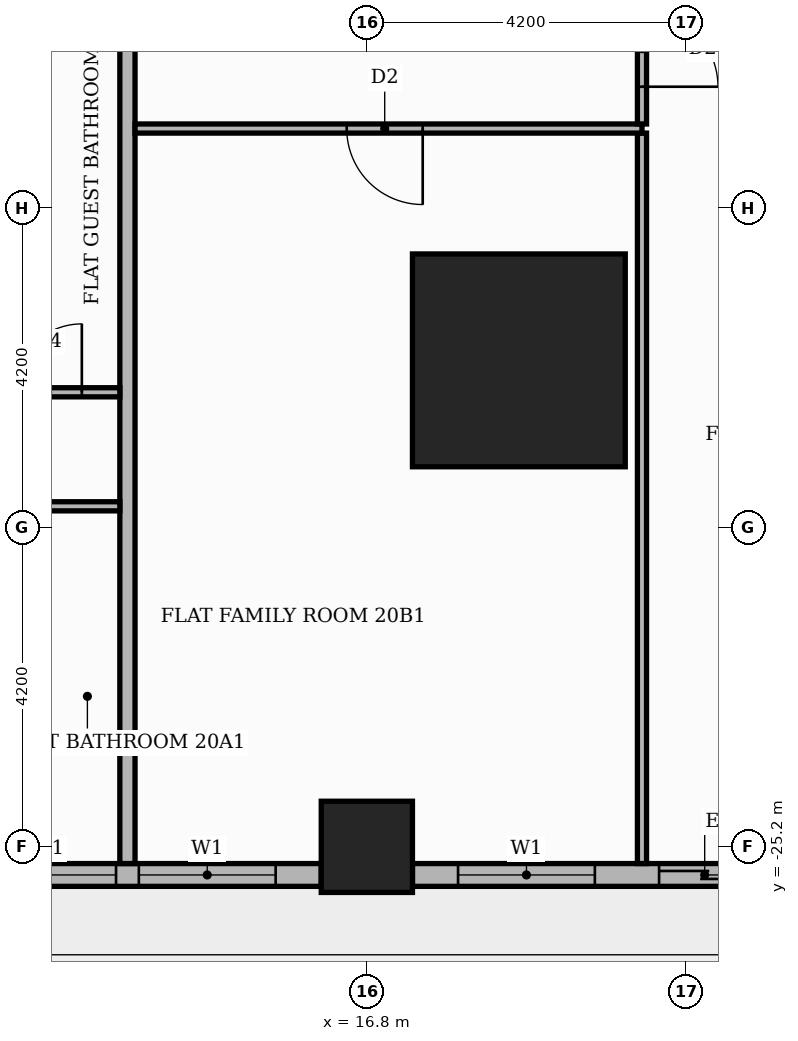
"""IFC4 building model, lengths in metres.
Left out: names, types, materials, properties, quantities, classifications, styles, units other than length and angle.
Written with IfcOpenShell. Run it as: python <this file> out.ifc"""

import sys

from ifc_helpers import new_model, si_unit, direction, frame, frame_2d, origin, origin_2d, place, context, subcontext, project, spatial, rectangle, extrude, element, fill, save


model = new_model("IFC4")
c1 = context("Model", 3, precision=1e-05, world=origin(), true_north=direction((0.0, 1.0)))
c2 = subcontext(c1, "Body", "Model", "MODEL_VIEW")
j1 = project(units=[si_unit("LENGTHUNIT", "METRE"), si_unit("PLANEANGLEUNIT", "RADIAN")], contexts=[c1])
p1 = place(None, origin())
s1 = spatial("IfcSite", under=j1, at=p1, CompositionType="ELEMENT")
p2 = place(p1, origin())
s2 = spatial("IfcBuilding", under=s1, at=p2, CompositionType="ELEMENT")
p3 = place(p2, frame((0.0, 0.0, 87.0)))
s3 = spatial("IfcBuildingStorey", under=s2, at=p3, CompositionType="ELEMENT", Elevation=87.0)
p4 = place(p3, frame((18.8, -18.8, 0.0), z_axis=(0.0, 0.0, 1.0), x_axis=(1.0, 0.0, 0.0)))
e1 = element("IfcColumn", 1, at=p4, inside=s3, PredefinedType="COLUMN", context=c2, shape_type="SweptSolid", body=[
    extrude(rectangle(XDim=2.8, YDim=2.8, at=origin_2d()), origin(), (0.0, 0.0, 1.0), 3.9),
])
p5 = place(p3, frame((16.8, -25.2, 0.0), z_axis=(0.0, 0.0, 1.0), x_axis=(1.0, 0.0, 0.0)))
e2 = element("IfcColumn", 2, at=p5, inside=s3, PredefinedType="COLUMN", context=c2, shape_type="SweptSolid", body=[
    extrude(rectangle(XDim=1.2, YDim=1.2, at=origin_2d()), origin(), (0.0, 0.0, 1.0), 3.9),
])
p6 = place(p3, frame((9.0, -25.57, 0.0), z_axis=(0.0, 0.0, 1.0), x_axis=(1.0, 0.0, 0.0)))
e3 = element("IfcWall", 3, at=p6, inside=s3, PredefinedType="STANDARD", context=c2, shape_type="SweptSolid", body=[
    extrude(rectangle(XDim=7.2, YDim=0.3, at=frame_2d((3.6, 0.0))), origin(), (0.0, 0.0, 1.0), 3.48),
])
p7 = place(p6, frame((0.6, 0.0, 0.9)))
e4 = element("IfcOpeningElement", 4, at=p7, cuts=e3, PredefinedType="OPENING", context=c2, shape_type="SweptSolid", body=[
    extrude(rectangle(XDim=1.8, YDim=2.1, at=frame_2d((0.9, 1.05))), frame((0.0, 0.16, 0.0), z_axis=(0.0, -1.0, 0.0), x_axis=(1.0, 0.0, 0.0)), (0.0, 0.0, 1.0), 0.32),
])
p8 = place(p6, frame((2.7, 0.0, 0.9)))
e5 = element("IfcOpeningElement", 5, at=p8, cuts=e3, PredefinedType="OPENING", context=c2, shape_type="SweptSolid", body=[
    extrude(rectangle(XDim=1.8, YDim=2.1, at=frame_2d((0.9, 1.05))), frame((0.0, 0.16, 0.0), z_axis=(0.0, -1.0, 0.0), x_axis=(1.0, 0.0, 0.0)), (0.0, 0.0, 1.0), 0.32),
])
p9 = place(p6, frame((4.8, 0.0, 0.9)))
e6 = element("IfcOpeningElement", 6, at=p9, cuts=e3, PredefinedType="OPENING", context=c2, shape_type="SweptSolid", body=[
    extrude(rectangle(XDim=1.8, YDim=2.1, at=frame_2d((0.9, 1.05))), frame((0.0, 0.16, 0.0), z_axis=(0.0, -1.0, 0.0), x_axis=(1.0, 0.0, 0.0)), (0.0, 0.0, 1.0), 0.32),
])
p10 = place(p3, frame((17.4, -25.57, 0.0), z_axis=(0.0, 0.0, 1.0), x_axis=(1.0, 0.0, 0.0)))
e7 = element("IfcWall", 7, at=p10, inside=s3, PredefinedType="STANDARD", context=c2, shape_type="SweptSolid", body=[
    extrude(rectangle(XDim=4.82, YDim=0.3, at=frame_2d((2.41, 0.0))), origin(), (0.0, 0.0, 1.0), 3.48),
])
p11 = place(p10, frame((0.6, 0.0, 0.9)))
e8 = element("IfcOpeningElement", 8, at=p11, cuts=e7, PredefinedType="OPENING", context=c2, shape_type="SweptSolid", body=[
    extrude(rectangle(XDim=1.8, YDim=2.1, at=frame_2d((0.9, 1.05))), frame((0.0, 0.16, 0.0), z_axis=(0.0, -1.0, 0.0), x_axis=(1.0, 0.0, 0.0)), (0.0, 0.0, 1.0), 0.32),
])
p12 = place(p10, frame((3.245, 0.0, 0.0)))
e9 = element("IfcOpeningElement", 9, at=p12, cuts=e7, PredefinedType="OPENING", context=c2, shape_type="SweptSolid", body=[
    extrude(rectangle(XDim=1.2, YDim=2.4, at=frame_2d((0.6, 1.2))), frame((0.0, 0.16, 0.0), z_axis=(0.0, -1.0, 0.0), x_axis=(1.0, 0.0, 0.0)), (0.0, 0.0, 1.0), 0.32),
])
p13 = place(p3, frame((13.65, -25.42, 0.0), z_axis=(0.0, 0.0, 1.0), x_axis=(0.0, 1.0, 0.0)))
e10 = element("IfcWall", 10, at=p13, inside=s3, PredefinedType="PARTITIONING", context=c2, shape_type="SweptSolid", body=[
    extrude(rectangle(XDim=11.67, YDim=0.2, at=frame_2d((5.835, 0.0))), origin(), (0.0, 0.0, 1.0), 3.48),
])
p14 = place(p3, frame((20.42, -25.42, 0.0), z_axis=(0.0, 0.0, 1.0), x_axis=(0.0, 1.0, 0.0)))
e11 = element("IfcWall", 11, at=p14, inside=s3, PredefinedType="PARTITIONING", context=c2, shape_type="SweptSolid", body=[
    extrude(rectangle(XDim=9.61, YDim=0.12, at=frame_2d((4.805, 0.0))), origin(), (0.0, 0.0, 1.0), 3.48),
])
p15 = place(p3, frame((-25.42, -20.72, 0.0), z_axis=(0.0, 0.0, 1.0), x_axis=(1.0, 0.0, 0.0)))
e12 = element("IfcWall", 12, at=p15, inside=s3, PredefinedType="PARTITIONING", context=c2, shape_type="SweptSolid", body=[
    extrude(rectangle(XDim=38.97, YDim=0.12, at=frame_2d((19.485, 0.0))), origin(), (0.0, 0.0, 1.0), 3.48),
])
p16 = place(p15, frame((12.32, 0.0, 0.0)))
e13 = element("IfcOpeningElement", 13, at=p16, cuts=e12, PredefinedType="OPENING", context=c2, shape_type="SweptSolid", body=[
    extrude(rectangle(XDim=1.0, YDim=2.1, at=frame_2d((0.5, 1.05))), frame((0.0, 0.07, 0.0), z_axis=(0.0, -1.0, 0.0), x_axis=(1.0, 0.0, 0.0)), (0.0, 0.0, 1.0), 0.14),
])
p17 = place(p15, frame((16.52, 0.0, 0.0)))
e14 = element("IfcOpeningElement", 14, at=p17, cuts=e12, PredefinedType="OPENING", context=c2, shape_type="SweptSolid", body=[
    extrude(rectangle(XDim=1.0, YDim=2.1, at=frame_2d((0.5, 1.05))), frame((0.0, 0.07, 0.0), z_axis=(0.0, -1.0, 0.0), x_axis=(1.0, 0.0, 0.0)), (0.0, 0.0, 1.0), 0.14),
])
p18 = place(p15, frame((23.92, 0.0, 0.0)))
e15 = element("IfcOpeningElement", 15, at=p18, cuts=e12, PredefinedType="OPENING", context=c2, shape_type="SweptSolid", body=[
    extrude(rectangle(XDim=0.9, YDim=2.1, at=frame_2d((0.45, 1.05))), frame((0.0, 0.07, 0.0), z_axis=(0.0, -1.0, 0.0), x_axis=(1.0, 0.0, 0.0)), (0.0, 0.0, 1.0), 0.14),
])
p19 = place(p15, frame((34.42, 0.0, 0.0)))
e16 = element("IfcOpeningElement", 16, at=p19, cuts=e12, PredefinedType="OPENING", context=c2, shape_type="SweptSolid", body=[
    extrude(rectangle(XDim=0.9, YDim=2.1, at=frame_2d((0.45, 1.05))), frame((0.0, 0.07, 0.0), z_axis=(0.0, -1.0, 0.0), x_axis=(1.0, 0.0, 0.0)), (0.0, 0.0, 1.0), 0.14),
])
p20 = place(p3, frame((-7.35, -19.22, 0.0), z_axis=(0.0, 0.0, 1.0), x_axis=(1.0, 0.0, 0.0)))
e17 = element("IfcWall", 17, at=p20, inside=s3, PredefinedType="PARTITIONING", context=c2, shape_type="SweptSolid", body=[
    extrude(rectangle(XDim=20.9, YDim=0.12, at=frame_2d((10.45, 0.0))), origin(), (0.0, 0.0, 1.0), 3.48),
])
p21 = place(p20, frame((2.7, 0.0, 0.0)))
e18 = element("IfcOpeningElement", 18, at=p21, cuts=e17, PredefinedType="OPENING", context=c2, shape_type="SweptSolid", body=[
    extrude(rectangle(XDim=0.9, YDim=2.1, at=frame_2d((0.45, 1.05))), frame((0.0, 0.07, 0.0), z_axis=(0.0, -1.0, 0.0), x_axis=(1.0, 0.0, 0.0)), (0.0, 0.0, 1.0), 0.14),
])
p22 = place(p20, frame((7.95, 0.0, 0.0)))
e19 = element("IfcOpeningElement", 19, at=p22, cuts=e17, PredefinedType="OPENING", context=c2, shape_type="SweptSolid", body=[
    extrude(rectangle(XDim=0.9, YDim=2.1, at=frame_2d((0.45, 1.05))), frame((0.0, 0.07, 0.0), z_axis=(0.0, -1.0, 0.0), x_axis=(1.0, 0.0, 0.0)), (0.0, 0.0, 1.0), 0.14),
])
p23 = place(p20, frame((13.05, 0.0, 0.0)))
e20 = element("IfcOpeningElement", 20, at=p23, cuts=e17, PredefinedType="OPENING", context=c2, shape_type="SweptSolid", body=[
    extrude(rectangle(XDim=0.9, YDim=2.1, at=frame_2d((0.45, 1.05))), frame((0.0, 0.07, 0.0), z_axis=(0.0, -1.0, 0.0), x_axis=(1.0, 0.0, 0.0)), (0.0, 0.0, 1.0), 0.14),
])
p24 = place(p20, frame((17.25, 0.0, 0.0)))
e21 = element("IfcOpeningElement", 21, at=p24, cuts=e17, PredefinedType="OPENING", context=c2, shape_type="SweptSolid", body=[
    extrude(rectangle(XDim=0.9, YDim=2.1, at=frame_2d((0.45, 1.05))), frame((0.0, 0.07, 0.0), z_axis=(0.0, -1.0, 0.0), x_axis=(1.0, 0.0, 0.0)), (0.0, 0.0, 1.0), 0.14),
])
p25 = place(p20, frame((19.5, 0.0, 0.0)))
e22 = element("IfcOpeningElement", 22, at=p25, cuts=e17, PredefinedType="OPENING", context=c2, shape_type="SweptSolid", body=[
    extrude(rectangle(XDim=0.9, YDim=2.1, at=frame_2d((0.45, 1.05))), frame((0.0, 0.07, 0.0), z_axis=(0.0, -1.0, 0.0), x_axis=(1.0, 0.0, 0.0)), (0.0, 0.0, 1.0), 0.14),
])
p26 = place(p3, frame((13.75, -15.75, 0.0), z_axis=(0.0, 0.0, 1.0), x_axis=(1.0, 0.0, 0.0)))
e23 = element("IfcWall", 23, at=p26, inside=s3, PredefinedType="PARTITIONING", context=c2, shape_type="SweptSolid", body=[
    extrude(rectangle(XDim=6.67, YDim=0.12, at=frame_2d((3.335, 0.0))), origin(), (0.0, 0.0, 1.0), 3.48),
])
p27 = place(p26, frame((2.785, 0.0, 0.0)))
e24 = element("IfcOpeningElement", 24, at=p27, cuts=e23, PredefinedType="OPENING", context=c2, shape_type="SweptSolid", body=[
    extrude(rectangle(XDim=1.0, YDim=2.1, at=frame_2d((0.5, 1.05))), frame((0.0, 0.07, 0.0), z_axis=(0.0, -1.0, 0.0), x_axis=(1.0, 0.0, 0.0)), (0.0, 0.0, 1.0), 0.14),
])
p28 = place(p3, frame((20.42, -15.69, 0.0), z_axis=(0.0, 0.0, 1.0), x_axis=(0.0, 1.0, 0.0)))
e25 = element("IfcWall", 25, at=p28, inside=s3, PredefinedType="PARTITIONING", context=c2, shape_type="SweptSolid", body=[
    extrude(rectangle(XDim=1.98, YDim=0.12, at=frame_2d((0.99, 0.0))), origin(), (0.0, 0.0, 1.0), 3.48),
])
p29 = place(p28, frame((0.49, 0.0, 0.0)))
e26 = element("IfcOpeningElement", 26, at=p29, cuts=e25, PredefinedType="OPENING", context=c2, shape_type="SweptSolid", body=[
    extrude(rectangle(XDim=1.0, YDim=2.1, at=frame_2d((0.5, 1.05))), frame((0.0, 0.07, 0.0), z_axis=(0.0, -1.0, 0.0), x_axis=(1.0, 0.0, 0.0)), (0.0, 0.0, 1.0), 0.14),
])
p30 = place(p8, origin())
e27 = element("IfcWindow", 27, at=p30, inside=s3, PartitioningType="SINGLE_PANEL", PredefinedType="WINDOW", context=c2, shape_type="SweptSolid", body=[
    extrude(rectangle(XDim=1.8, YDim=2.1, at=frame_2d((0.9, 1.05))), frame((0.0, 0.03, 0.0), z_axis=(0.0, -1.0, 0.0), x_axis=(1.0, 0.0, 0.0)), (0.0, 0.0, 1.0), 0.06),
])
fill(e5, e27)
p31 = place(p9, origin())
e28 = element("IfcWindow", 28, at=p31, inside=s3, PartitioningType="SINGLE_PANEL", PredefinedType="WINDOW", context=c2, shape_type="SweptSolid", body=[
    extrude(rectangle(XDim=1.8, YDim=2.1, at=frame_2d((0.9, 1.05))), frame((0.0, 0.03, 0.0), z_axis=(0.0, -1.0, 0.0), x_axis=(1.0, 0.0, 0.0)), (0.0, 0.0, 1.0), 0.06),
])
fill(e6, e28)
p32 = place(p11, origin())
e29 = element("IfcWindow", 29, at=p32, inside=s3, PartitioningType="SINGLE_PANEL", PredefinedType="WINDOW", context=c2, shape_type="SweptSolid", body=[
    extrude(rectangle(XDim=1.8, YDim=2.1, at=frame_2d((0.9, 1.05))), frame((0.0, 0.03, 0.0), z_axis=(0.0, -1.0, 0.0), x_axis=(1.0, 0.0, 0.0)), (0.0, 0.0, 1.0), 0.06),
])
fill(e8, e29)
p33 = place(p12, origin())
e30 = element("IfcDoor", 30, at=p33, inside=s3, OperationType="SLIDING_TO_RIGHT", PredefinedType="DOOR", context=c2, shape_type="SweptSolid", body=[
    extrude(rectangle(XDim=1.2, YDim=2.4, at=frame_2d((0.6, 1.2))), frame((0.0, 0.025, 0.0), z_axis=(0.0, -1.0, 0.0), x_axis=(1.0, 0.0, 0.0)), (0.0, 0.0, 1.0), 0.05),
])
fill(e9, e30)
p34 = place(p25, origin())
e31 = element("IfcDoor", 31, at=p34, inside=s3, OperationType="SINGLE_SWING_RIGHT", PredefinedType="DOOR", context=c2, shape_type="SweptSolid", body=[
    extrude(rectangle(XDim=0.9, YDim=2.1, at=frame_2d((0.45, 1.05))), frame((0.0, 0.025, 0.0), z_axis=(0.0, -1.0, 0.0), x_axis=(1.0, 0.0, 0.0)), (0.0, 0.0, 1.0), 0.05),
])
fill(e22, e31)
p35 = place(p27, frame((1.0, 0.0, 0.0), z_axis=(0.0, 0.0, 1.0), x_axis=(-1.0, 0.0, 0.0)))
e32 = element("IfcDoor", 32, at=p35, inside=s3, OperationType="SINGLE_SWING_RIGHT", PredefinedType="DOOR", context=c2, shape_type="SweptSolid", body=[
    extrude(rectangle(XDim=1.0, YDim=2.1, at=frame_2d((0.5, 1.05))), frame((0.0, 0.025, 0.0), z_axis=(0.0, -1.0, 0.0), x_axis=(1.0, 0.0, 0.0)), (0.0, 0.0, 1.0), 0.05),
])
fill(e24, e32)
p36 = place(p29, frame((1.0, 0.0, 0.0), z_axis=(0.0, 0.0, 1.0), x_axis=(-1.0, 0.0, 0.0)))
e33 = element("IfcDoor", 33, at=p36, inside=s3, OperationType="SINGLE_SWING_LEFT", PredefinedType="DOOR", context=c2, shape_type="SweptSolid", body=[
    extrude(rectangle(XDim=1.0, YDim=2.1, at=frame_2d((0.5, 1.05))), frame((0.0, 0.025, 0.0), z_axis=(0.0, -1.0, 0.0), x_axis=(1.0, 0.0, 0.0)), (0.0, 0.0, 1.0), 0.05),
])
fill(e26, e33)
save(model, sys.argv[1])
